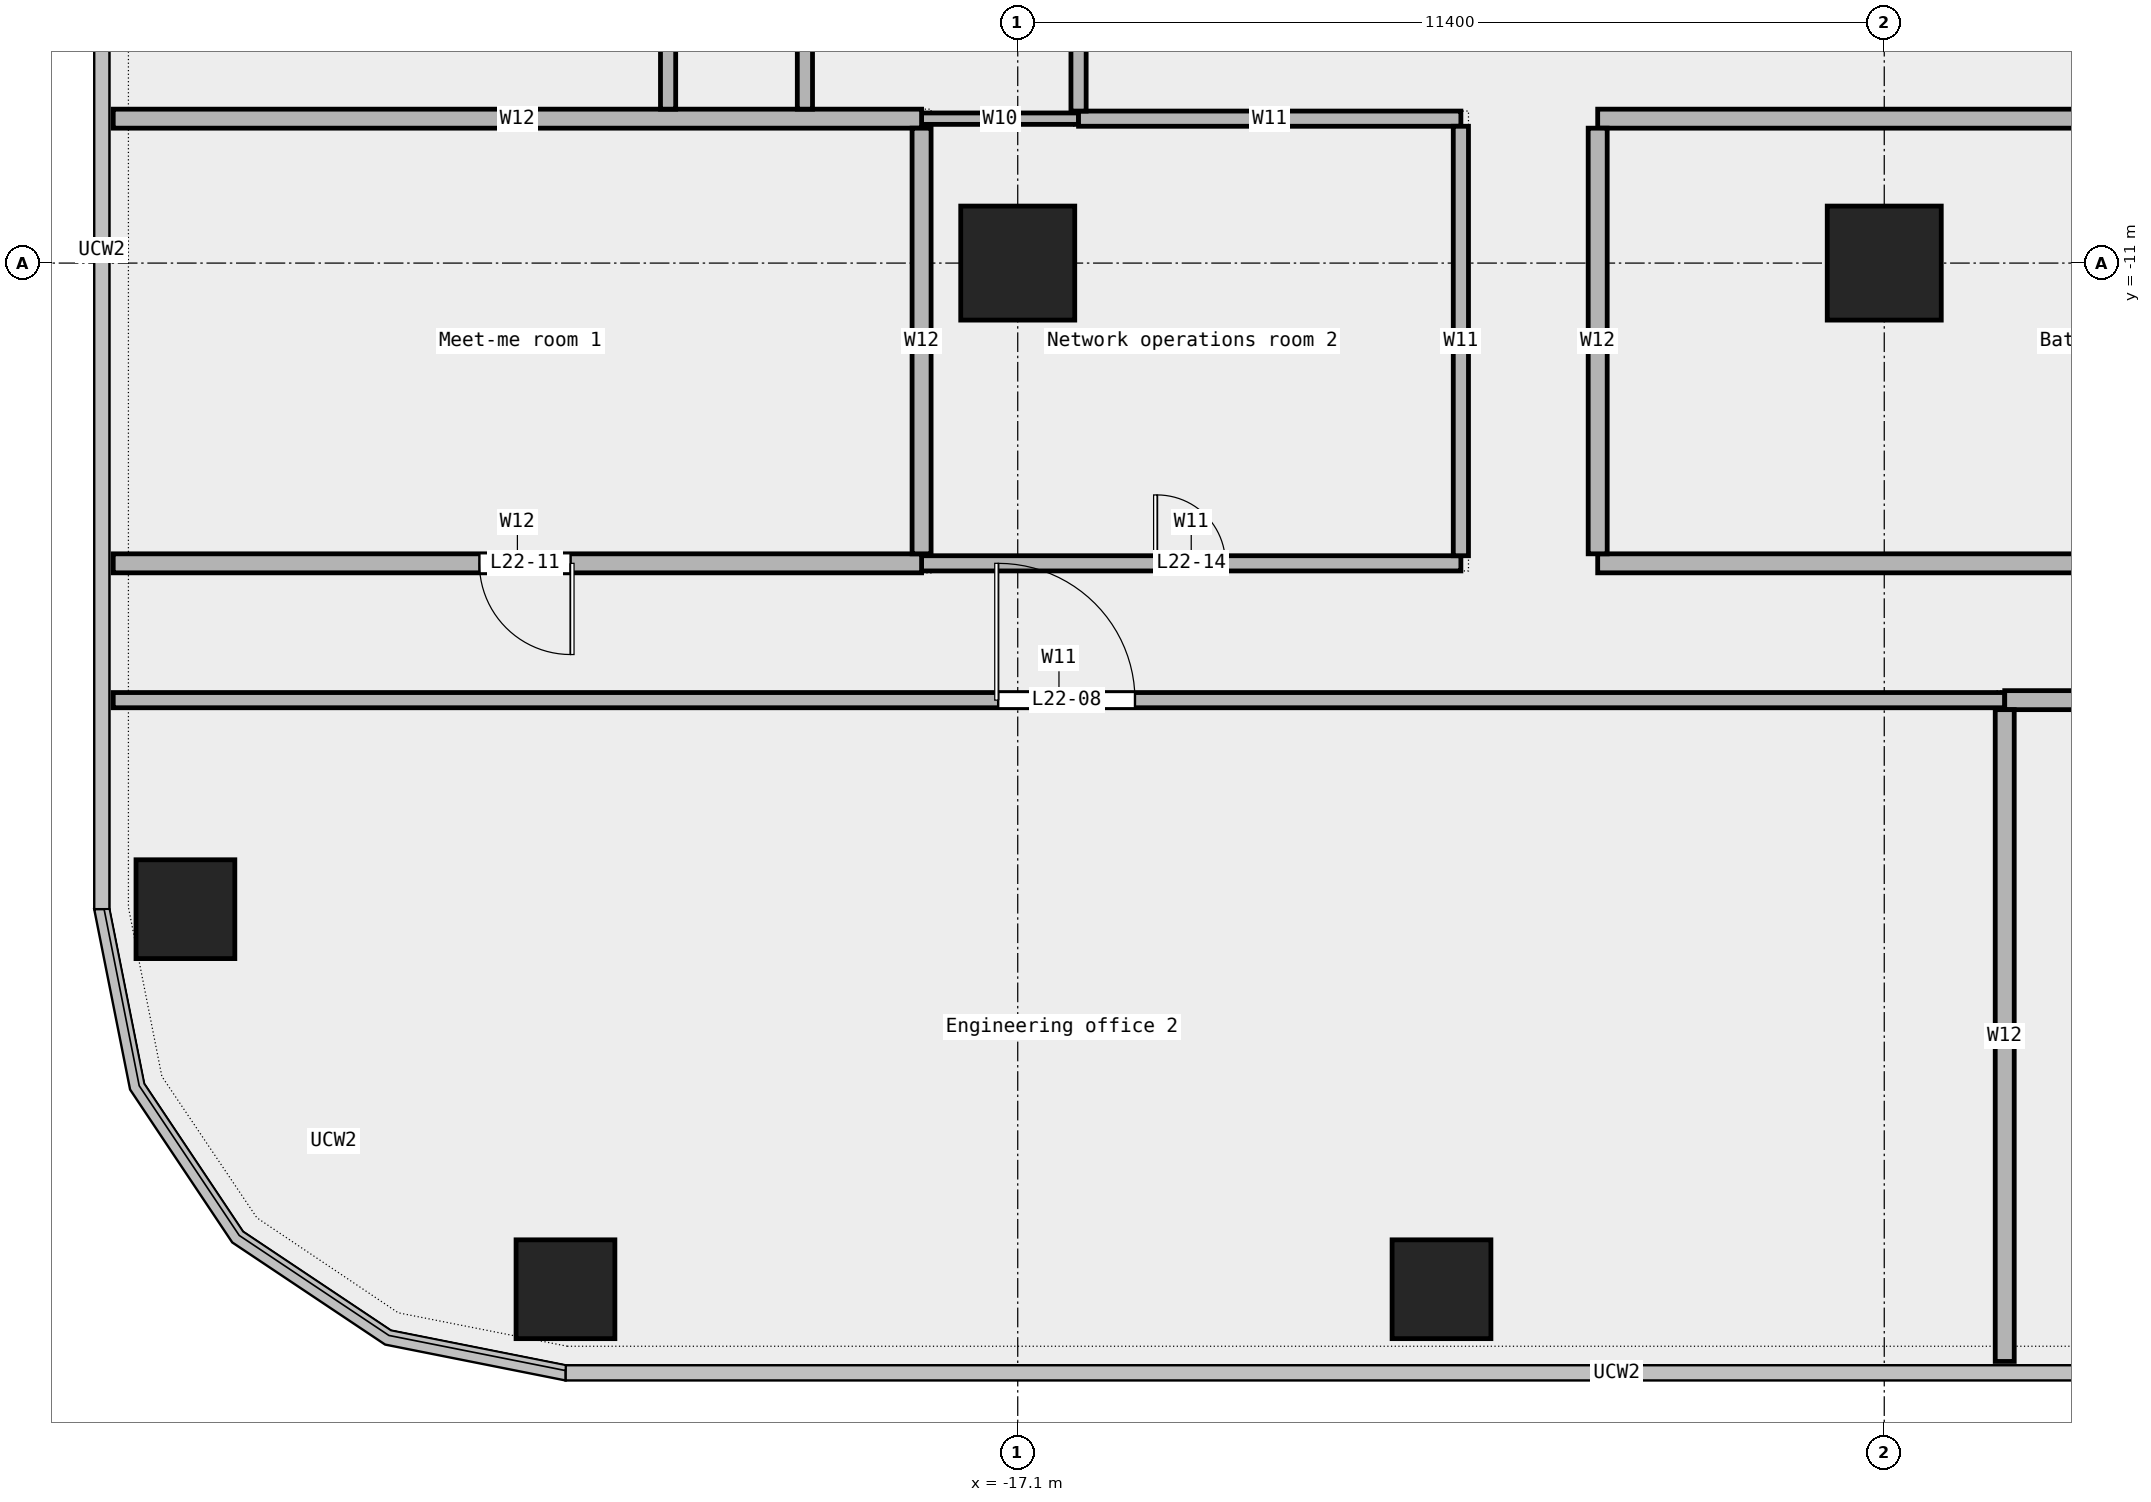
"""IFC4 building model, lengths in metres.
Left out: names, types, materials, properties, quantities, classifications, styles, units other than length and angle.
Written with IfcOpenShell. Run it as: python <this file> out.ifc"""

import sys

from ifc_helpers import new_model, si_unit, direction, frame, frame_2d, origin, origin_2d, place, context, subcontext, project, spatial, rectangle, extrude, element, fill, save


model = new_model("IFC4")
c1 = context("Model", 3, precision=1e-05, world=origin(), true_north=direction((0.0, 1.0)))
c2 = subcontext(c1, "Body", "Model", "MODEL_VIEW")
j1 = project(units=[si_unit("LENGTHUNIT", "METRE"), si_unit("PLANEANGLEUNIT", "RADIAN")], contexts=[c1])
p1 = place(None, origin())
s1 = spatial("IfcSite", under=j1, at=p1, CompositionType="ELEMENT")
p2 = place(p1, origin())
s2 = spatial("IfcBuilding", under=s1, at=p2, CompositionType="ELEMENT")
p3 = place(p2, frame((0.0, 0.0, 112.6)))
s3 = spatial("IfcBuildingStorey", under=s2, at=p3, CompositionType="ELEMENT", Elevation=112.6)
for number, where, z_axis, x_axis in (
    (1, (-23.05, -24.5, 0.0), (0.0, 0.0, 1.0), (1.0, 0.0, 0.0)),
    (2, (-11.525, -24.5, 0.0), (0.0, 0.0, 1.0), (1.0, 0.0, 0.0)),
    (3, (-28.05, -19.5, 0.0), (0.0, 0.0, 1.0), (1.0, 0.0, 0.0)),
):
    element("IfcColumn", number, at=place(p3, frame(where, z_axis=z_axis, x_axis=x_axis)), inside=s3, PredefinedType="COLUMN", context=c2, shape_type="SweptSolid", body=[
        extrude(rectangle(XDim=1.3, YDim=1.3, at=origin_2d()), origin(), (0.0, 0.0, 1.0), 4.05),
    ])
for number, where, z_axis, x_axis in (
    (4, (-17.1, -11.0, 0.0), (0.0, 0.0, 1.0), (1.0, 0.0, 0.0)),
    (5, (-5.7, -11.0, 0.0), (0.0, 0.0, 1.0), (1.0, 0.0, 0.0)),
):
    element("IfcColumn", number, at=place(p3, frame(where, z_axis=z_axis, x_axis=x_axis)), inside=s3, PredefinedType="COLUMN", context=c2, shape_type="SweptSolid", body=[
        extrude(rectangle(XDim=1.5, YDim=1.5, at=origin_2d()), origin(), (0.0, 0.0, 1.0), 4.05),
    ])
p4 = place(p3, frame((-29.0, -16.75, 0.0), z_axis=(0.0, 0.0, 1.0), x_axis=(1.0, 0.0, 0.0)))
e6 = element("IfcWall", 6, at=p4, inside=s3, PredefinedType="PARTITIONING", context=c2, shape_type="SweptSolid", body=[
    extrude(rectangle(XDim=24.885, YDim=0.2, at=frame_2d((12.442, 0.0))), origin(), (0.0, 0.0, 1.0), 4.05),
])
p5 = place(p4, frame((11.643, 0.0, 0.0)))
e7 = element("IfcOpeningElement", 7, at=p5, cuts=e6, PredefinedType="OPENING", context=c2, shape_type="SweptSolid", body=[
    extrude(rectangle(XDim=1.8, YDim=2.1, at=frame_2d((0.9, 1.05))), frame((0.0, 0.112, 0.0), z_axis=(0.0, -1.0, 0.0), x_axis=(1.0, 0.0, 0.0)), (0.0, 0.0, 1.0), 0.224),
])
p6 = place(p3, frame((-4.115, -16.75, 0.0), z_axis=(0.0, 0.0, 1.0), x_axis=(1.0, 0.0, 0.0)))
e8 = element("IfcWall", 8, at=p6, inside=s3, PredefinedType="PARTITIONING", context=c2, shape_type="SweptSolid", body=[
    extrude(rectangle(XDim=8.725, YDim=0.25, at=frame_2d((4.363, 0.0))), origin(), (0.0, 0.0, 1.0), 4.05),
])
p7 = place(p6, frame((3.462, 0.0, 0.0)))
e9 = element("IfcOpeningElement", 9, at=p7, cuts=e8, PredefinedType="OPENING", context=c2, shape_type="SweptSolid", body=[
    extrude(rectangle(XDim=1.8, YDim=2.1, at=frame_2d((0.9, 1.05))), frame((0.0, 0.137, 0.0), z_axis=(0.0, -1.0, 0.0), x_axis=(1.0, 0.0, 0.0)), (0.0, 0.0, 1.0), 0.274),
])
p8 = place(p3, frame((-18.365, -14.95, 0.0), z_axis=(0.0, 0.0, 1.0), x_axis=(1.0, 0.0, 0.0)))
e10 = element("IfcWall", 10, at=p8, inside=s3, PredefinedType="PARTITIONING", context=c2, shape_type="SweptSolid", body=[
    extrude(rectangle(XDim=7.095, YDim=0.2, at=frame_2d((3.547, 0.0))), origin(), (0.0, 0.0, 1.0), 4.05),
])
p9 = place(p8, frame((3.097, 0.0, 0.0)))
e11 = element("IfcOpeningElement", 11, at=p9, cuts=e10, PredefinedType="OPENING", context=c2, shape_type="SweptSolid", body=[
    extrude(rectangle(XDim=0.9, YDim=2.1, at=frame_2d((0.45, 1.05))), frame((0.0, 0.112, 0.0), z_axis=(0.0, -1.0, 0.0), x_axis=(1.0, 0.0, 0.0)), (0.0, 0.0, 1.0), 0.224),
])
p10 = place(p3, frame((-29.0, -14.95, 0.0), z_axis=(0.0, 0.0, 1.0), x_axis=(1.0, 0.0, 0.0)))
e12 = element("IfcWall", 12, at=p10, inside=s3, PredefinedType="PARTITIONING", context=c2, shape_type="SweptSolid", body=[
    extrude(rectangle(XDim=10.635, YDim=0.25, at=frame_2d((5.317, 0.0))), origin(), (0.0, 0.0, 1.0), 4.05),
])
p11 = place(p10, frame((4.817, 0.0, 0.0)))
e13 = element("IfcOpeningElement", 13, at=p11, cuts=e12, PredefinedType="OPENING", context=c2, shape_type="SweptSolid", body=[
    extrude(rectangle(XDim=1.2, YDim=2.1, at=frame_2d((0.6, 1.05))), frame((0.0, 0.137, 0.0), z_axis=(0.0, -1.0, 0.0), x_axis=(1.0, 0.0, 0.0)), (0.0, 0.0, 1.0), 0.274),
])
p12 = place(p3, frame((-9.47, -14.95, 0.0), z_axis=(0.0, 0.0, 1.0), x_axis=(1.0, 0.0, 0.0)))
e14 = element("IfcWall", 14, at=p12, inside=s3, PredefinedType="PARTITIONING", context=c2, shape_type="SweptSolid", body=[
    extrude(rectangle(XDim=16.06, YDim=0.25, at=frame_2d((8.03, 0.0))), origin(), (0.0, 0.0, 1.0), 4.05),
])
p13 = place(p3, frame((-18.365, -9.1, 0.0), z_axis=(0.0, 0.0, 1.0), x_axis=(1.0, 0.0, 0.0)))
e15 = element("IfcWall", 15, at=p13, inside=s3, PredefinedType="PARTITIONING", context=c2, shape_type="SweptSolid", body=[
    extrude(rectangle(XDim=2.065, YDim=0.15, at=frame_2d((1.032, 0.0))), origin(), (0.0, 0.0, 1.0), 4.05),
])
p14 = place(p3, frame((-16.3, -9.1, 0.0), z_axis=(0.0, 0.0, 1.0), x_axis=(1.0, 0.0, 0.0)))
e16 = element("IfcWall", 16, at=p14, inside=s3, PredefinedType="PARTITIONING", context=c2, shape_type="SweptSolid", body=[
    extrude(rectangle(XDim=5.03, YDim=0.2, at=frame_2d((2.515, 0.0))), origin(), (0.0, 0.0, 1.0), 4.05),
])
p15 = place(p3, frame((-29.0, -9.1, 0.0), z_axis=(0.0, 0.0, 1.0), x_axis=(1.0, 0.0, 0.0)))
e17 = element("IfcWall", 17, at=p15, inside=s3, PredefinedType="PARTITIONING", context=c2, shape_type="SweptSolid", body=[
    extrude(rectangle(XDim=10.635, YDim=0.25, at=frame_2d((5.317, 0.0))), origin(), (0.0, 0.0, 1.0), 4.05),
])
p16 = place(p3, frame((-9.47, -9.1, 0.0), z_axis=(0.0, 0.0, 1.0), x_axis=(1.0, 0.0, 0.0)))
e18 = element("IfcWall", 18, at=p16, inside=s3, PredefinedType="PARTITIONING", context=c2, shape_type="SweptSolid", body=[
    extrude(rectangle(XDim=16.06, YDim=0.25, at=frame_2d((8.03, 0.0))), origin(), (0.0, 0.0, 1.0), 4.05),
])
p17 = place(p16, frame((7.43, 0.0, 0.0)))
e19 = element("IfcOpeningElement", 19, at=p17, cuts=e18, PredefinedType="OPENING", context=c2, shape_type="SweptSolid", body=[
    extrude(rectangle(XDim=1.2, YDim=2.1, at=frame_2d((0.6, 1.05))), frame((0.0, 0.137, 0.0), z_axis=(0.0, -1.0, 0.0), x_axis=(1.0, 0.0, 0.0)), (0.0, 0.0, 1.0), 0.274),
])
p18 = place(p3, frame((-21.7, -8.975, 0.0), z_axis=(0.0, 0.0, 1.0), x_axis=(0.0, 1.0, 0.0)))
e20 = element("IfcWall", 20, at=p18, inside=s3, PredefinedType="PARTITIONING", context=c2, shape_type="SweptSolid", body=[
    extrude(rectangle(XDim=24.25, YDim=0.2, at=frame_2d((12.125, 0.0))), origin(), (0.0, 0.0, 1.0), 4.05),
])
p19 = place(p18, frame((2.805, 0.0, 0.0)))
e21 = element("IfcOpeningElement", 21, at=p19, cuts=e20, PredefinedType="OPENING", context=c2, shape_type="SweptSolid", body=[
    extrude(rectangle(XDim=1.2, YDim=2.1, at=frame_2d((0.6, 1.05))), frame((0.0, 0.112, 0.0), z_axis=(0.0, -1.0, 0.0), x_axis=(1.0, 0.0, 0.0)), (0.0, 0.0, 1.0), 0.224),
])
p20 = place(p18, frame((21.58, 0.0, 0.0)))
e22 = element("IfcOpeningElement", 22, at=p20, cuts=e20, PredefinedType="OPENING", context=c2, shape_type="SweptSolid", body=[
    extrude(rectangle(XDim=0.9, YDim=2.1, at=frame_2d((0.45, 1.05))), frame((0.0, 0.112, 0.0), z_axis=(0.0, -1.0, 0.0), x_axis=(1.0, 0.0, 0.0)), (0.0, 0.0, 1.0), 0.224),
])
p21 = place(p18, frame((12.71, 0.0, 0.0)))
e23 = element("IfcOpeningElement", 23, at=p21, cuts=e20, PredefinedType="OPENING", context=c2, shape_type="SweptSolid", body=[
    extrude(rectangle(XDim=1.2, YDim=2.1, at=frame_2d((0.6, 1.05))), frame((0.0, 0.112, 0.0), z_axis=(0.0, -1.0, 0.0), x_axis=(1.0, 0.0, 0.0)), (0.0, 0.0, 1.0), 0.224),
])
p22 = place(p3, frame((-19.9, -8.975, 0.0), z_axis=(0.0, 0.0, 1.0), x_axis=(0.0, 1.0, 0.0)))
e24 = element("IfcWall", 24, at=p22, inside=s3, PredefinedType="PARTITIONING", context=c2, shape_type="SweptSolid", body=[
    extrude(rectangle(XDim=6.06, YDim=0.2, at=frame_2d((3.03, 0.0))), origin(), (0.0, 0.0, 1.0), 4.05),
])
p23 = place(p3, frame((-18.365, -14.825, 0.0), z_axis=(0.0, 0.0, 1.0), x_axis=(0.0, 1.0, 0.0)))
e25 = element("IfcWall", 25, at=p23, inside=s3, PredefinedType="PARTITIONING", context=c2, shape_type="SweptSolid", body=[
    extrude(rectangle(XDim=5.6, YDim=0.25, at=frame_2d((2.8, 0.0))), origin(), (0.0, 0.0, 1.0), 4.05),
])
p24 = place(p3, frame((-16.3, -9.0, 0.0), z_axis=(0.0, 0.0, 1.0), x_axis=(0.0, 1.0, 0.0)))
e26 = element("IfcWall", 26, at=p24, inside=s3, PredefinedType="PARTITIONING", context=c2, shape_type="SweptSolid", body=[
    extrude(rectangle(XDim=6.085, YDim=0.2, at=frame_2d((3.042, 0.0))), origin(), (0.0, 0.0, 1.0), 4.05),
])
p25 = place(p24, frame((2.593, 0.0, 0.0)))
e27 = element("IfcOpeningElement", 27, at=p25, cuts=e26, PredefinedType="OPENING", context=c2, shape_type="SweptSolid", body=[
    extrude(rectangle(XDim=0.9, YDim=2.1, at=frame_2d((0.45, 1.05))), frame((0.0, 0.112, 0.0), z_axis=(0.0, -1.0, 0.0), x_axis=(1.0, 0.0, 0.0)), (0.0, 0.0, 1.0), 0.224),
])
p26 = place(p3, frame((-11.27, -14.85, 0.0), z_axis=(0.0, 0.0, 1.0), x_axis=(0.0, 1.0, 0.0)))
e28 = element("IfcWall", 28, at=p26, inside=s3, PredefinedType="PARTITIONING", context=c2, shape_type="SweptSolid", body=[
    extrude(rectangle(XDim=5.65, YDim=0.2, at=frame_2d((2.825, 0.0))), origin(), (0.0, 0.0, 1.0), 4.05),
])
p27 = place(p3, frame((-9.47, -14.825, 0.0), z_axis=(0.0, 0.0, 1.0), x_axis=(0.0, 1.0, 0.0)))
e29 = element("IfcWall", 29, at=p27, inside=s3, PredefinedType="PARTITIONING", context=c2, shape_type="SweptSolid", body=[
    extrude(rectangle(XDim=5.6, YDim=0.25, at=frame_2d((2.8, 0.0))), origin(), (0.0, 0.0, 1.0), 4.05),
])
p28 = place(p3, frame((-4.115, -25.45, 0.0), z_axis=(0.0, 0.0, 1.0), x_axis=(0.0, 1.0, 0.0)))
e30 = element("IfcWall", 30, at=p28, inside=s3, PredefinedType="PARTITIONING", context=c2, shape_type="SweptSolid", body=[
    extrude(rectangle(XDim=8.575, YDim=0.25, at=frame_2d((4.288, 0.0))), origin(), (0.0, 0.0, 1.0), 4.05),
])
p29 = place(p5, origin())
e31 = element("IfcDoor", 31, at=p29, inside=s3, OperationType="DOUBLE_DOOR_SINGLE_SWING", PredefinedType="DOOR", context=c2, shape_type="SweptSolid", body=[
    extrude(rectangle(XDim=1.8, YDim=2.1, at=frame_2d((0.9, 1.05))), frame((0.0, 0.025, 0.0), z_axis=(0.0, -1.0, 0.0), x_axis=(1.0, 0.0, 0.0)), (0.0, 0.0, 1.0), 0.05),
])
fill(e7, e31)
p30 = place(p11, origin())
e32 = element("IfcDoor", 32, at=p30, inside=s3, OperationType="SINGLE_SWING_LEFT", PredefinedType="DOOR", context=c2, shape_type="SweptSolid", body=[
    extrude(rectangle(XDim=1.2, YDim=2.1, at=frame_2d((0.6, 1.05))), frame((0.0, 0.025, 0.0), z_axis=(0.0, -1.0, 0.0), x_axis=(1.0, 0.0, 0.0)), (0.0, 0.0, 1.0), 0.05),
])
fill(e13, e32)
p31 = place(p9, origin())
e33 = element("IfcDoor", 33, at=p31, inside=s3, OperationType="SINGLE_SWING_LEFT", PredefinedType="DOOR", context=c2, shape_type="SweptSolid", body=[
    extrude(rectangle(XDim=0.9, YDim=2.1, at=frame_2d((0.45, 1.05))), frame((0.0, 0.025, 0.0), z_axis=(0.0, -1.0, 0.0), x_axis=(1.0, 0.0, 0.0)), (0.0, 0.0, 1.0), 0.05),
])
fill(e11, e33)
save(model, sys.argv[1])
